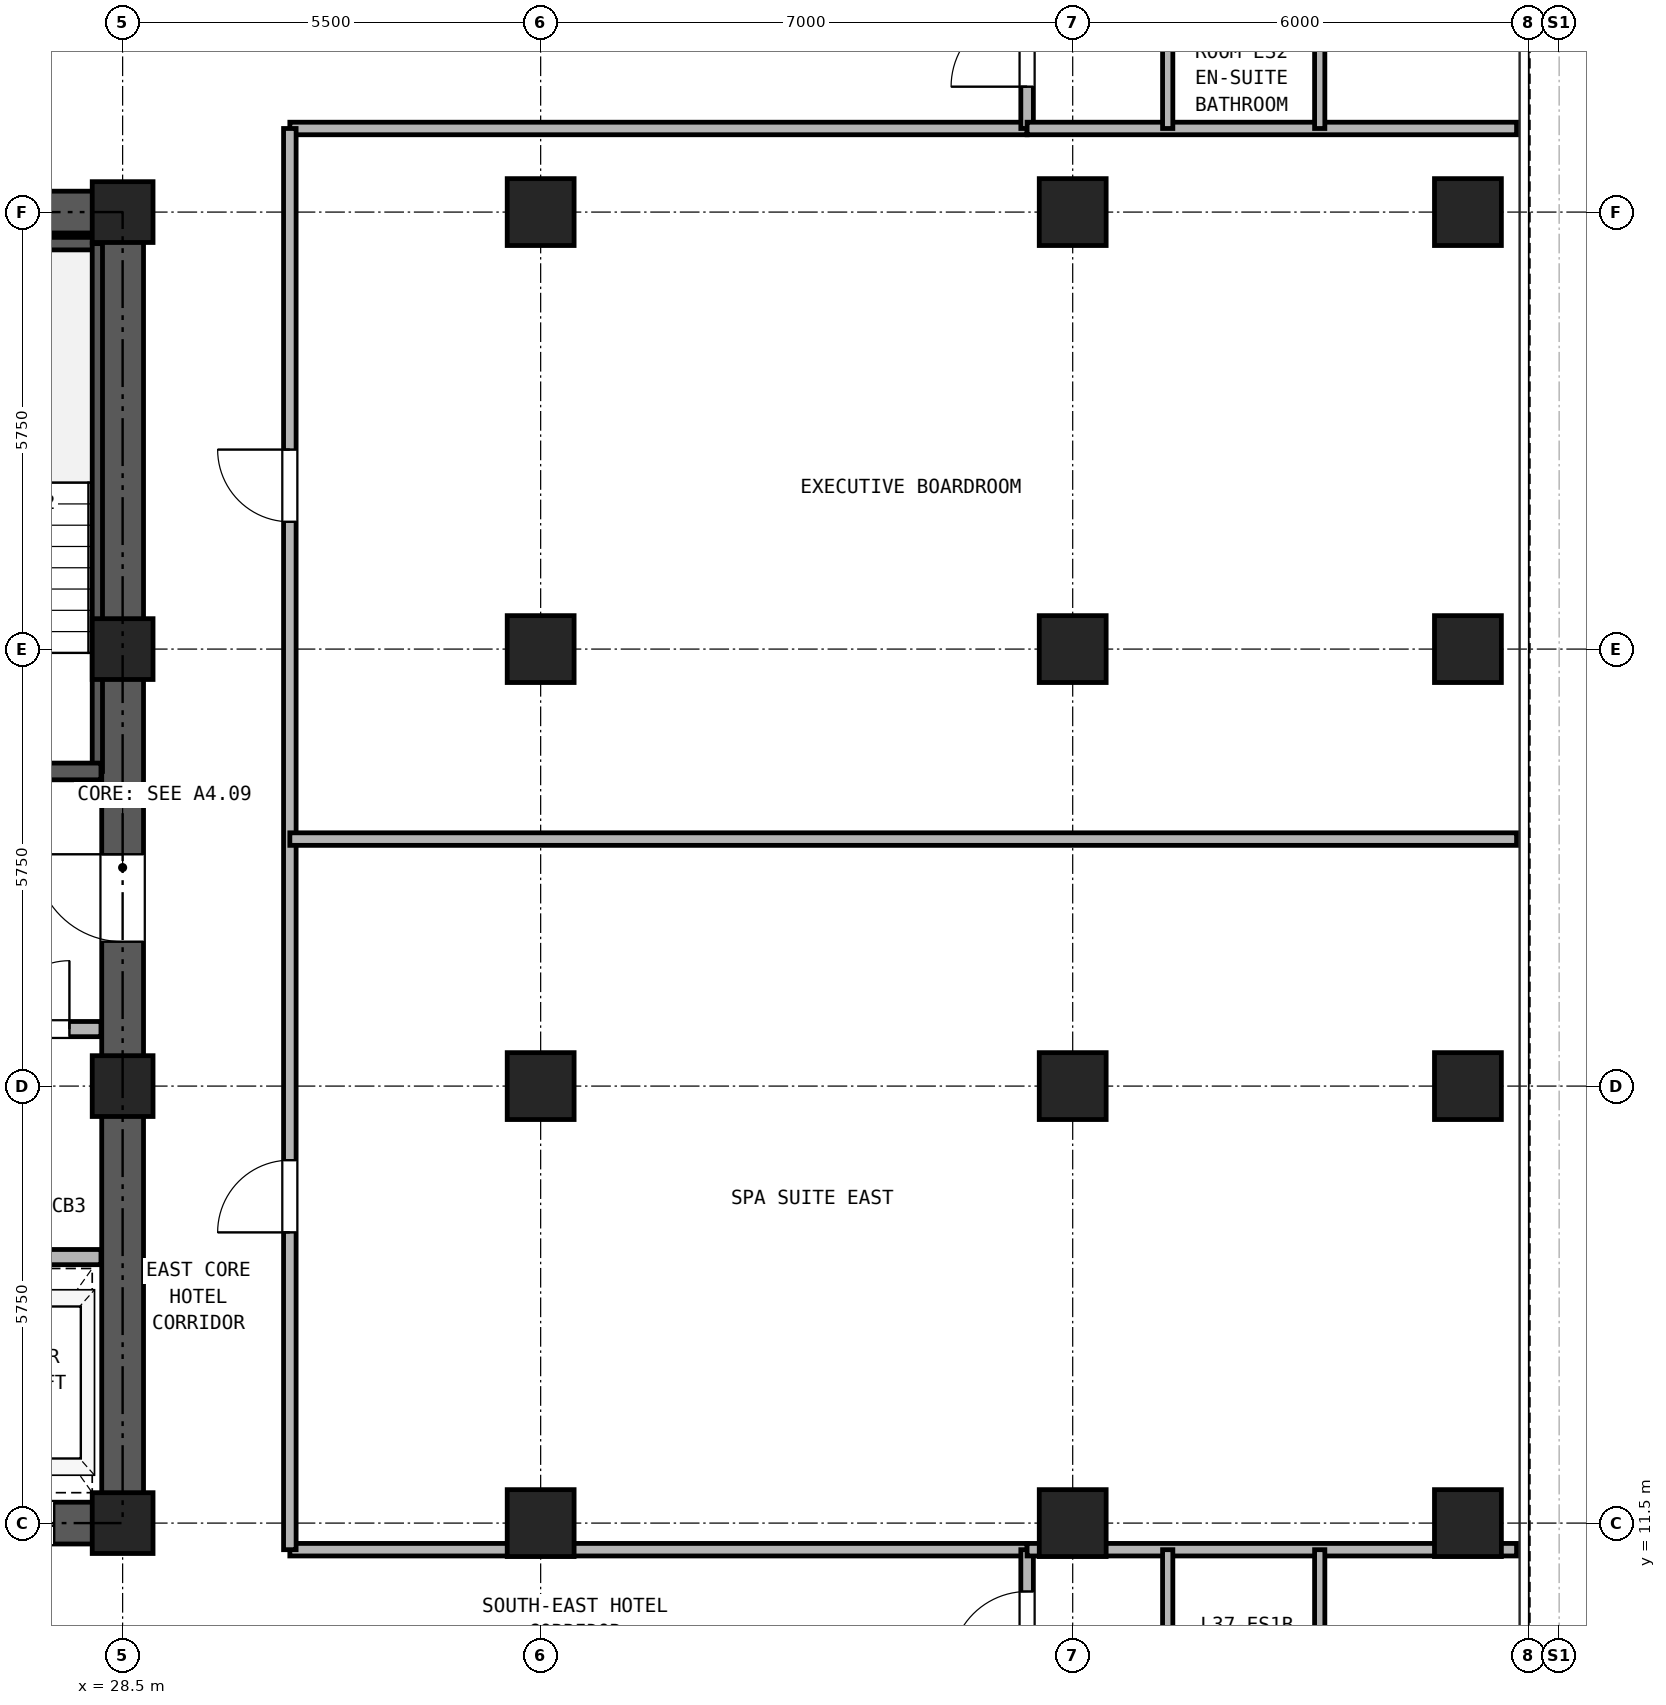
"""IFC4 building model, lengths in metres.
Left out: names, types, materials, properties, quantities, classifications, styles, units other than length and angle.
Written with IfcOpenShell. Run it as: python <this file> out.ifc"""

import sys

from ifc_helpers import new_model, si_unit, direction, frame, frame_2d, origin, origin_2d, place, context, subcontext, project, spatial, rectangle, hollow_rectangle, extrude, source, transform, mapped, element, fill, save


model = new_model("IFC4")
c1 = context("Model", 3, precision=1e-05, world=origin(), true_north=direction((0.0, 1.0)))
c2 = subcontext(c1, "Body", "Model", "MODEL_VIEW")
j1 = project(units=[si_unit("LENGTHUNIT", "METRE"), si_unit("PLANEANGLEUNIT", "RADIAN")], contexts=[c1])
p1 = place(None, origin())
s1 = spatial("IfcSite", under=j1, at=p1, CompositionType="ELEMENT")
p2 = place(p1, origin())
s2 = spatial("IfcBuilding", under=s1, at=p2, CompositionType="ELEMENT")
p3 = place(p2, frame((0.0, 0.0, 134.3)))
s3 = spatial("IfcBuildingStorey", under=s2, at=p3, CompositionType="ELEMENT", Elevation=134.3)
m1 = source(origin(), c2, "Body", "SweptSolid", [
    extrude(hollow_rectangle(XDim=0.88, YDim=0.88, WallThickness=0.05, at=origin_2d()), origin(), (0.0, 0.0, 1.0), 2.95),
])
for number, where, z_axis, x_axis in (
    (1, (46.2, 11.5, 0.0), (0.0, 0.0, 1.0), (1.0, 0.0, 0.0)),
    (2, (46.2, 17.25, 0.0), (0.0, 0.0, 1.0), (1.0, 0.0, 0.0)),
    (3, (46.2, 23.0, 0.0), (0.0, 0.0, 1.0), (1.0, 0.0, 0.0)),
    (4, (46.2, 28.75, 0.0), (0.0, 0.0, 1.0), (1.0, 0.0, 0.0)),
):
    element("IfcColumn", number, at=place(p3, frame(where, z_axis=z_axis, x_axis=x_axis)), inside=s3, PredefinedType="COLUMN", context=c2, shape_type="MappedRepresentation", body=[
        mapped(m1, transform((0.0, 0.0, 0.0), x_axis=(1.0, 0.0, 0.0), y_axis=(0.0, 1.0, 0.0), z_axis=(0.0, 0.0, 1.0), scale=1.0)),
    ])
m2 = source(origin(), c2, "Body", "SweptSolid", [
    extrude(hollow_rectangle(XDim=0.8, YDim=0.8, WallThickness=0.045, at=origin_2d()), origin(), (0.0, 0.0, 1.0), 2.95),
])
for number, where, z_axis, x_axis in (
    (5, (28.5, 11.5, 0.0), (0.0, 0.0, 1.0), (1.0, 0.0, 0.0)),
    (6, (28.5, 17.25, 0.0), (0.0, 0.0, 1.0), (1.0, 0.0, 0.0)),
    (7, (28.5, 23.0, 0.0), (0.0, 0.0, 1.0), (1.0, 0.0, 0.0)),
    (8, (28.5, 28.75, 0.0), (0.0, 0.0, 1.0), (1.0, 0.0, 0.0)),
):
    element("IfcColumn", number, at=place(p3, frame(where, z_axis=z_axis, x_axis=x_axis)), inside=s3, PredefinedType="COLUMN", context=c2, shape_type="MappedRepresentation", body=[
        mapped(m2, transform((0.0, 0.0, 0.0), x_axis=(1.0, 0.0, 0.0), y_axis=(0.0, 1.0, 0.0), z_axis=(0.0, 0.0, 1.0), scale=1.0)),
    ])
for number, where, z_axis, x_axis in (
    (9, (34.0, 11.5, 0.0), (0.0, 0.0, 1.0), (1.0, 0.0, 0.0)),
    (10, (34.0, 17.25, 0.0), (0.0, 0.0, 1.0), (1.0, 0.0, 0.0)),
    (11, (34.0, 23.0, 0.0), (0.0, 0.0, 1.0), (1.0, 0.0, 0.0)),
    (12, (34.0, 28.75, 0.0), (0.0, 0.0, 1.0), (1.0, 0.0, 0.0)),
    (13, (41.0, 11.5, 0.0), (0.0, 0.0, 1.0), (1.0, 0.0, 0.0)),
    (14, (41.0, 17.25, 0.0), (0.0, 0.0, 1.0), (1.0, 0.0, 0.0)),
    (15, (41.0, 23.0, 0.0), (0.0, 0.0, 1.0), (1.0, 0.0, 0.0)),
    (16, (41.0, 28.75, 0.0), (0.0, 0.0, 1.0), (1.0, 0.0, 0.0)),
):
    element("IfcColumn", number, at=place(p3, frame(where, z_axis=z_axis, x_axis=x_axis)), inside=s3, PredefinedType="COLUMN", context=c2, shape_type="MappedRepresentation", body=[
        mapped(m1, transform((0.0, 0.0, 0.0), x_axis=(1.0, 0.0, 0.0), y_axis=(0.0, 1.0, 0.0), z_axis=(0.0, 0.0, 1.0), scale=1.0)),
    ])
p4 = place(p3, frame((18.225, 11.5, 0.0), z_axis=(0.0, 0.0, 1.0), x_axis=(1.0, 0.0, 0.0)))
e17 = element("IfcWall", 17, at=p4, inside=s3, PredefinedType="SHEAR", context=c2, shape_type="SweptSolid", body=[
    extrude(rectangle(XDim=10.55, YDim=0.55, at=frame_2d((5.275, 0.0))), origin(), (0.0, 0.0, 1.0), 2.95),
])
p5 = place(p4, frame((2.375, 0.0, 0.0)))
e18 = element("IfcOpeningElement", 18, at=p5, cuts=e17, PredefinedType="OPENING", context=c2, shape_type="SweptSolid", body=[
    extrude(rectangle(XDim=0.95, YDim=2.15, at=frame_2d((0.475, 1.075))), frame((0.0, 0.285, 0.0), z_axis=(0.0, -1.0, 0.0), x_axis=(1.0, 0.0, 0.0)), (0.0, 0.0, 1.0), 0.57),
])
p6 = place(p4, frame((5.875, 0.0, 0.0)))
e19 = element("IfcOpeningElement", 19, at=p6, cuts=e17, PredefinedType="OPENING", context=c2, shape_type="SweptSolid", body=[
    extrude(rectangle(XDim=1.1, YDim=2.25, at=frame_2d((0.55, 1.125))), frame((0.0, 0.285, 0.0), z_axis=(0.0, -1.0, 0.0), x_axis=(1.0, 0.0, 0.0)), (0.0, 0.0, 1.0), 0.57),
])
p7 = place(p4, frame((8.275, 0.0, 0.0)))
e20 = element("IfcOpeningElement", 20, at=p7, cuts=e17, PredefinedType="OPENING", context=c2, shape_type="SweptSolid", body=[
    extrude(rectangle(XDim=1.1, YDim=2.25, at=frame_2d((0.55, 1.125))), frame((0.0, 0.285, 0.0), z_axis=(0.0, -1.0, 0.0), x_axis=(1.0, 0.0, 0.0)), (0.0, 0.0, 1.0), 0.57),
])
p8 = place(p3, frame((18.225, 28.75, 0.0), z_axis=(0.0, 0.0, 1.0), x_axis=(1.0, 0.0, 0.0)))
e21 = element("IfcWall", 21, at=p8, inside=s3, PredefinedType="SHEAR", context=c2, shape_type="SweptSolid", body=[
    extrude(rectangle(XDim=10.55, YDim=0.55, at=frame_2d((5.275, 0.0))), origin(), (0.0, 0.0, 1.0), 2.95),
])
p9 = place(p8, frame((4.155, 0.0, 0.0)))
e22 = element("IfcOpeningElement", 22, at=p9, cuts=e21, PredefinedType="OPENING", context=c2, shape_type="SweptSolid", body=[
    extrude(rectangle(XDim=0.9, YDim=2.05, at=frame_2d((0.45, 1.025))), frame((0.0, 0.285, 0.0), z_axis=(0.0, -1.0, 0.0), x_axis=(1.0, 0.0, 0.0)), (0.0, 0.0, 1.0), 0.57),
])
p10 = place(p8, frame((5.695, 0.0, 0.0)))
e23 = element("IfcOpeningElement", 23, at=p10, cuts=e21, PredefinedType="OPENING", context=c2, shape_type="SweptSolid", body=[
    extrude(rectangle(XDim=0.9, YDim=2.05, at=frame_2d((0.45, 1.025))), frame((0.0, 0.285, 0.0), z_axis=(0.0, -1.0, 0.0), x_axis=(1.0, 0.0, 0.0)), (0.0, 0.0, 1.0), 0.57),
])
p11 = place(p3, frame((28.5, 11.775, 0.0), z_axis=(0.0, 0.0, 1.0), x_axis=(0.0, 1.0, 0.0)))
e24 = element("IfcWall", 24, at=p11, inside=s3, PredefinedType="SHEAR", context=c2, shape_type="SweptSolid", body=[
    extrude(rectangle(XDim=16.7, YDim=0.55, at=frame_2d((8.35, 0.0))), origin(), (0.0, 0.0, 1.0), 2.95),
])
p12 = place(p11, frame((7.375, 0.0, 0.0)))
e25 = element("IfcOpeningElement", 25, at=p12, cuts=e24, PredefinedType="OPENING", context=c2, shape_type="SweptSolid", body=[
    extrude(rectangle(XDim=1.15, YDim=2.2, at=frame_2d((0.575, 1.1))), frame((0.0, 0.285, 0.0), z_axis=(0.0, -1.0, 0.0), x_axis=(1.0, 0.0, 0.0)), (0.0, 0.0, 1.0), 0.57),
])
p13 = place(p3, frame((25.13, 28.335, 0.0), z_axis=(0.0, 0.0, 1.0), x_axis=(1.0, 0.0, 0.0)))
e26 = element("IfcWall", 26, at=p13, inside=s3, PredefinedType="PARTITIONING", context=c2, shape_type="SweptSolid", body=[
    extrude(rectangle(XDim=3.085, YDim=0.165, at=frame_2d((1.542, 0.0))), origin(), (0.0, 0.0, 1.0), 2.95),
])
p14 = place(p3, frame((28.167, 21.39, 0.0), z_axis=(0.0, 0.0, 1.0), x_axis=(0.0, 1.0, 0.0)))
e27 = element("IfcWall", 27, at=p14, inside=s3, PredefinedType="PARTITIONING", context=c2, shape_type="SweptSolid", body=[
    extrude(rectangle(XDim=6.945, YDim=0.135, at=frame_2d((3.473, 0.0))), origin(), (0.0, 0.0, 1.0), 2.95),
])
p15 = place(p3, frame((25.13, 21.39, 0.0), z_axis=(0.0, 0.0, 1.0), x_axis=(1.0, 0.0, 0.0)))
e28 = element("IfcWall", 28, at=p15, inside=s3, PredefinedType="SOLIDWALL", context=c2, shape_type="SweptSolid", body=[
    extrude(rectangle(XDim=3.085, YDim=0.22, at=frame_2d((1.542, 0.0))), origin(), (0.0, 0.0, 1.0), 2.95),
])
p16 = place(p15, frame((0.92, 0.0, 0.0)))
e29 = element("IfcOpeningElement", 29, at=p16, cuts=e28, PredefinedType="OPENING", context=c2, shape_type="SweptSolid", body=[
    extrude(rectangle(XDim=1.15, YDim=2.2, at=frame_2d((0.575, 1.1))), frame((0.0, 0.12, 0.0), z_axis=(0.0, -1.0, 0.0), x_axis=(1.0, 0.0, 0.0)), (0.0, 0.0, 1.0), 0.24),
])
p17 = place(p3, frame((18.785, 18.0, 0.0), z_axis=(0.0, 0.0, 1.0), x_axis=(1.0, 0.0, 0.0)))
e30 = element("IfcWall", 30, at=p17, inside=s3, PredefinedType="PARTITIONING", context=c2, shape_type="SweptSolid", body=[
    extrude(rectangle(XDim=9.43, YDim=0.2, at=frame_2d((4.715, 0.0))), origin(), (0.0, 0.0, 1.0), 2.95),
])
p18 = place(p17, frame((0.465, 0.0, 0.0)))
e31 = element("IfcOpeningElement", 31, at=p18, cuts=e30, PredefinedType="OPENING", context=c2, shape_type="SweptSolid", body=[
    extrude(rectangle(XDim=1.3, YDim=2.3, at=frame_2d((0.65, 1.15))), frame((0.0, 0.11, 0.0), z_axis=(0.0, -1.0, 0.0), x_axis=(1.0, 0.0, 0.0)), (0.0, 0.0, 1.0), 0.22),
])
p19 = place(p17, frame((2.565, 0.0, 0.0)))
e32 = element("IfcOpeningElement", 32, at=p19, cuts=e30, PredefinedType="OPENING", context=c2, shape_type="SweptSolid", body=[
    extrude(rectangle(XDim=1.3, YDim=2.3, at=frame_2d((0.65, 1.15))), frame((0.0, 0.11, 0.0), z_axis=(0.0, -1.0, 0.0), x_axis=(1.0, 0.0, 0.0)), (0.0, 0.0, 1.0), 0.22),
])
p20 = place(p17, frame((4.985, 0.0, 0.0)))
e33 = element("IfcOpeningElement", 33, at=p20, cuts=e30, PredefinedType="OPENING", context=c2, shape_type="SweptSolid", body=[
    extrude(rectangle(XDim=0.9, YDim=2.05, at=frame_2d((0.45, 1.025))), frame((0.0, 0.11, 0.0), z_axis=(0.0, -1.0, 0.0), x_axis=(1.0, 0.0, 0.0)), (0.0, 0.0, 1.0), 0.22),
])
p21 = place(p17, frame((8.115, 0.0, 0.0)))
e34 = element("IfcOpeningElement", 34, at=p21, cuts=e30, PredefinedType="OPENING", context=c2, shape_type="SweptSolid", body=[
    extrude(rectangle(XDim=0.9, YDim=2.05, at=frame_2d((0.45, 1.025))), frame((0.0, 0.11, 0.0), z_axis=(0.0, -1.0, 0.0), x_axis=(1.0, 0.0, 0.0)), (0.0, 0.0, 1.0), 0.22),
])
p22 = place(p3, frame((18.785, 15.0, 0.0), z_axis=(0.0, 0.0, 1.0), x_axis=(1.0, 0.0, 0.0)))
e35 = element("IfcWall", 35, at=p22, inside=s3, PredefinedType="PARTITIONING", context=c2, shape_type="SweptSolid", body=[
    extrude(rectangle(XDim=9.43, YDim=0.2, at=frame_2d((4.715, 0.0))), origin(), (0.0, 0.0, 1.0), 2.95),
])
for number, where, z_axis, x_axis in (
    (36, (30.7, 11.15, 0.0), (0.0, 0.0, 1.0), (1.0, 0.0, 0.0)),
    (37, (30.7, 29.85, 0.0), (0.0, 0.0, 1.0), (1.0, 0.0, 0.0)),
):
    element("IfcWall", number, at=place(p3, frame(where, z_axis=z_axis, x_axis=x_axis)), inside=s3, PredefinedType="PARTITIONING", context=c2, shape_type="SweptSolid", body=[
        extrude(rectangle(XDim=9.7, YDim=0.165, at=frame_2d((4.85, 0.0))), origin(), (0.0, 0.0, 1.0), 2.95),
    ])
p23 = place(p3, frame((30.7, 11.15, 0.0), z_axis=(0.0, 0.0, 1.0), x_axis=(0.0, 1.0, 0.0)))
e38 = element("IfcWall", 38, at=p23, inside=s3, PredefinedType="PARTITIONING", context=c2, shape_type="SweptSolid", body=[
    extrude(rectangle(XDim=18.7, YDim=0.165, at=frame_2d((9.35, 0.0))), origin(), (0.0, 0.0, 1.0), 2.95),
])
p24 = place(p23, frame((4.175, 0.0, 0.0)))
e39 = element("IfcOpeningElement", 39, at=p24, cuts=e38, PredefinedType="OPENING", context=c2, shape_type="SweptSolid", body=[
    extrude(rectangle(XDim=0.95, YDim=2.15, at=frame_2d((0.475, 1.075))), frame((0.0, 0.093, 0.0), z_axis=(0.0, -1.0, 0.0), x_axis=(1.0, 0.0, 0.0)), (0.0, 0.0, 1.0), 0.185),
])
p25 = place(p23, frame((13.525, 0.0, 0.0)))
e40 = element("IfcOpeningElement", 40, at=p25, cuts=e38, PredefinedType="OPENING", context=c2, shape_type="SweptSolid", body=[
    extrude(rectangle(XDim=0.95, YDim=2.15, at=frame_2d((0.475, 1.075))), frame((0.0, 0.093, 0.0), z_axis=(0.0, -1.0, 0.0), x_axis=(1.0, 0.0, 0.0)), (0.0, 0.0, 1.0), 0.185),
])
p26 = place(p3, frame((40.4, 0.16, 0.0), z_axis=(0.0, 0.0, 1.0), x_axis=(0.0, 1.0, 0.0)))
e41 = element("IfcWall", 41, at=p26, inside=s3, PredefinedType="PARTITIONING", context=c2, shape_type="SweptSolid", body=[
    extrude(rectangle(XDim=10.99, YDim=0.165, at=frame_2d((5.495, 0.0))), origin(), (0.0, 0.0, 1.0), 2.95),
])
p27 = place(p26, frame((9.44, 0.0, 0.0)))
e42 = element("IfcOpeningElement", 42, at=p27, cuts=e41, PredefinedType="OPENING", context=c2, shape_type="SweptSolid", body=[
    extrude(rectangle(XDim=1.0, YDim=2.15, at=frame_2d((0.5, 1.075))), frame((0.0, 0.093, 0.0), z_axis=(0.0, -1.0, 0.0), x_axis=(1.0, 0.0, 0.0)), (0.0, 0.0, 1.0), 0.185),
])
p28 = place(p3, frame((40.4, 29.85, 0.0), z_axis=(0.0, 0.0, 1.0), x_axis=(0.0, 1.0, 0.0)))
e43 = element("IfcWall", 43, at=p28, inside=s3, PredefinedType="PARTITIONING", context=c2, shape_type="SweptSolid", body=[
    extrude(rectangle(XDim=5.29, YDim=0.165, at=frame_2d((2.645, 0.0))), origin(), (0.0, 0.0, 1.0), 2.95),
])
p29 = place(p28, frame((0.55, 0.0, 0.0)))
e44 = element("IfcOpeningElement", 44, at=p29, cuts=e43, PredefinedType="OPENING", context=c2, shape_type="SweptSolid", body=[
    extrude(rectangle(XDim=1.0, YDim=2.15, at=frame_2d((0.5, 1.075))), frame((0.0, 0.093, 0.0), z_axis=(0.0, -1.0, 0.0), x_axis=(1.0, 0.0, 0.0)), (0.0, 0.0, 1.0), 0.185),
])
for number, where, z_axis, x_axis in (
    (45, (40.4, 11.15, 0.0), (0.0, 0.0, 1.0), (1.0, 0.0, 0.0)),
    (46, (40.4, 29.85, 0.0), (0.0, 0.0, 1.0), (1.0, 0.0, 0.0)),
):
    element("IfcWall", number, at=place(p3, frame(where, z_axis=z_axis, x_axis=x_axis)), inside=s3, PredefinedType="PARTITIONING", context=c2, shape_type="SweptSolid", body=[
        extrude(rectangle(XDim=6.44, YDim=0.165, at=frame_2d((3.22, 0.0))), origin(), (0.0, 0.0, 1.0), 2.95),
    ])
for number, where, z_axis, x_axis in (
    (47, (42.25, 9.05, 0.0), (0.0, 0.0, 1.0), (0.0, 1.0, 0.0)),
    (48, (44.25, 9.05, 0.0), (0.0, 0.0, 1.0), (0.0, 1.0, 0.0)),
    (49, (42.25, 29.85, 0.0), (0.0, 0.0, 1.0), (0.0, 1.0, 0.0)),
    (50, (44.25, 29.85, 0.0), (0.0, 0.0, 1.0), (0.0, 1.0, 0.0)),
):
    element("IfcWall", number, at=place(p3, frame(where, z_axis=z_axis, x_axis=x_axis)), inside=s3, PredefinedType="PARTITIONING", context=c2, shape_type="SweptSolid", body=[
        extrude(rectangle(XDim=2.1, YDim=0.135, at=frame_2d((1.05, 0.0))), origin(), (0.0, 0.0, 1.0), 2.95),
    ])
p30 = place(p3, frame((30.7, 20.5, 0.0), z_axis=(0.0, 0.0, 1.0), x_axis=(1.0, 0.0, 0.0)))
e51 = element("IfcWall", 51, at=p30, inside=s3, PredefinedType="PARTITIONING", context=c2, shape_type="SweptSolid", body=[
    extrude(rectangle(XDim=16.14, YDim=0.165, at=frame_2d((8.07, 0.0))), origin(), (0.0, 0.0, 1.0), 2.95),
])
p31 = place(p21, frame((0.9, 0.0, 0.0), z_axis=(0.0, 0.0, 1.0), x_axis=(-1.0, 0.0, 0.0)))
e52 = element("IfcDoor", 52, at=p31, inside=s3, OperationType="SINGLE_SWING_RIGHT", PredefinedType="DOOR", context=c2, shape_type="SweptSolid", body=[
    extrude(rectangle(XDim=0.9, YDim=2.05, at=frame_2d((0.45, 1.025))), frame((0.0, 0.025, 0.0), z_axis=(0.0, -1.0, 0.0), x_axis=(1.0, 0.0, 0.0)), (0.0, 0.0, 1.0), 0.05),
])
fill(e34, e52)
p32 = place(p12, origin())
e53 = element("IfcDoor", 53, at=p32, inside=s3, OperationType="SINGLE_SWING_RIGHT", PredefinedType="DOOR", context=c2, shape_type="SweptSolid", body=[
    extrude(rectangle(XDim=1.15, YDim=2.2, at=frame_2d((0.575, 1.1))), frame((0.0, 0.025, 0.0), z_axis=(0.0, -1.0, 0.0), x_axis=(1.0, 0.0, 0.0)), (0.0, 0.0, 1.0), 0.05),
])
fill(e25, e53)
p33 = place(p7, frame((1.1, 0.0, 0.0), z_axis=(0.0, 0.0, 1.0), x_axis=(-1.0, 0.0, 0.0)))
e54 = element("IfcDoor", 54, at=p33, inside=s3, OperationType="DOUBLE_DOOR_SLIDING", PredefinedType="DOOR", context=c2, shape_type="SweptSolid", body=[
    extrude(rectangle(XDim=1.1, YDim=2.25, at=frame_2d((0.55, 1.125))), frame((0.0, 0.025, 0.0), z_axis=(0.0, -1.0, 0.0), x_axis=(1.0, 0.0, 0.0)), (0.0, 0.0, 1.0), 0.05),
])
fill(e20, e54)
p34 = place(p27, frame((1.0, 0.0, 0.0), z_axis=(0.0, 0.0, 1.0), x_axis=(-1.0, 0.0, 0.0)))
e55 = element("IfcDoor", 55, at=p34, inside=s3, OperationType="SINGLE_SWING_LEFT", PredefinedType="DOOR", context=c2, shape_type="SweptSolid", body=[
    extrude(rectangle(XDim=1.0, YDim=2.15, at=frame_2d((0.5, 1.075))), frame((0.0, 0.025, 0.0), z_axis=(0.0, -1.0, 0.0), x_axis=(1.0, 0.0, 0.0)), (0.0, 0.0, 1.0), 0.05),
])
fill(e42, e55)
p35 = place(p29, frame((1.0, 0.0, 0.0), z_axis=(0.0, 0.0, 1.0), x_axis=(-1.0, 0.0, 0.0)))
e56 = element("IfcDoor", 56, at=p35, inside=s3, OperationType="SINGLE_SWING_LEFT", PredefinedType="DOOR", context=c2, shape_type="SweptSolid", body=[
    extrude(rectangle(XDim=1.0, YDim=2.15, at=frame_2d((0.5, 1.075))), frame((0.0, 0.025, 0.0), z_axis=(0.0, -1.0, 0.0), x_axis=(1.0, 0.0, 0.0)), (0.0, 0.0, 1.0), 0.05),
])
fill(e44, e56)
p36 = place(p24, origin())
e57 = element("IfcDoor", 57, at=p36, inside=s3, OperationType="SINGLE_SWING_LEFT", PredefinedType="DOOR", context=c2, shape_type="SweptSolid", body=[
    extrude(rectangle(XDim=0.95, YDim=2.15, at=frame_2d((0.475, 1.075))), frame((0.0, 0.025, 0.0), z_axis=(0.0, -1.0, 0.0), x_axis=(1.0, 0.0, 0.0)), (0.0, 0.0, 1.0), 0.05),
])
fill(e39, e57)
p37 = place(p25, origin())
e58 = element("IfcDoor", 58, at=p37, inside=s3, OperationType="SINGLE_SWING_RIGHT", PredefinedType="DOOR", context=c2, shape_type="SweptSolid", body=[
    extrude(rectangle(XDim=0.95, YDim=2.15, at=frame_2d((0.475, 1.075))), frame((0.0, 0.025, 0.0), z_axis=(0.0, -1.0, 0.0), x_axis=(1.0, 0.0, 0.0)), (0.0, 0.0, 1.0), 0.05),
])
fill(e40, e58)
save(model, sys.argv[1])
